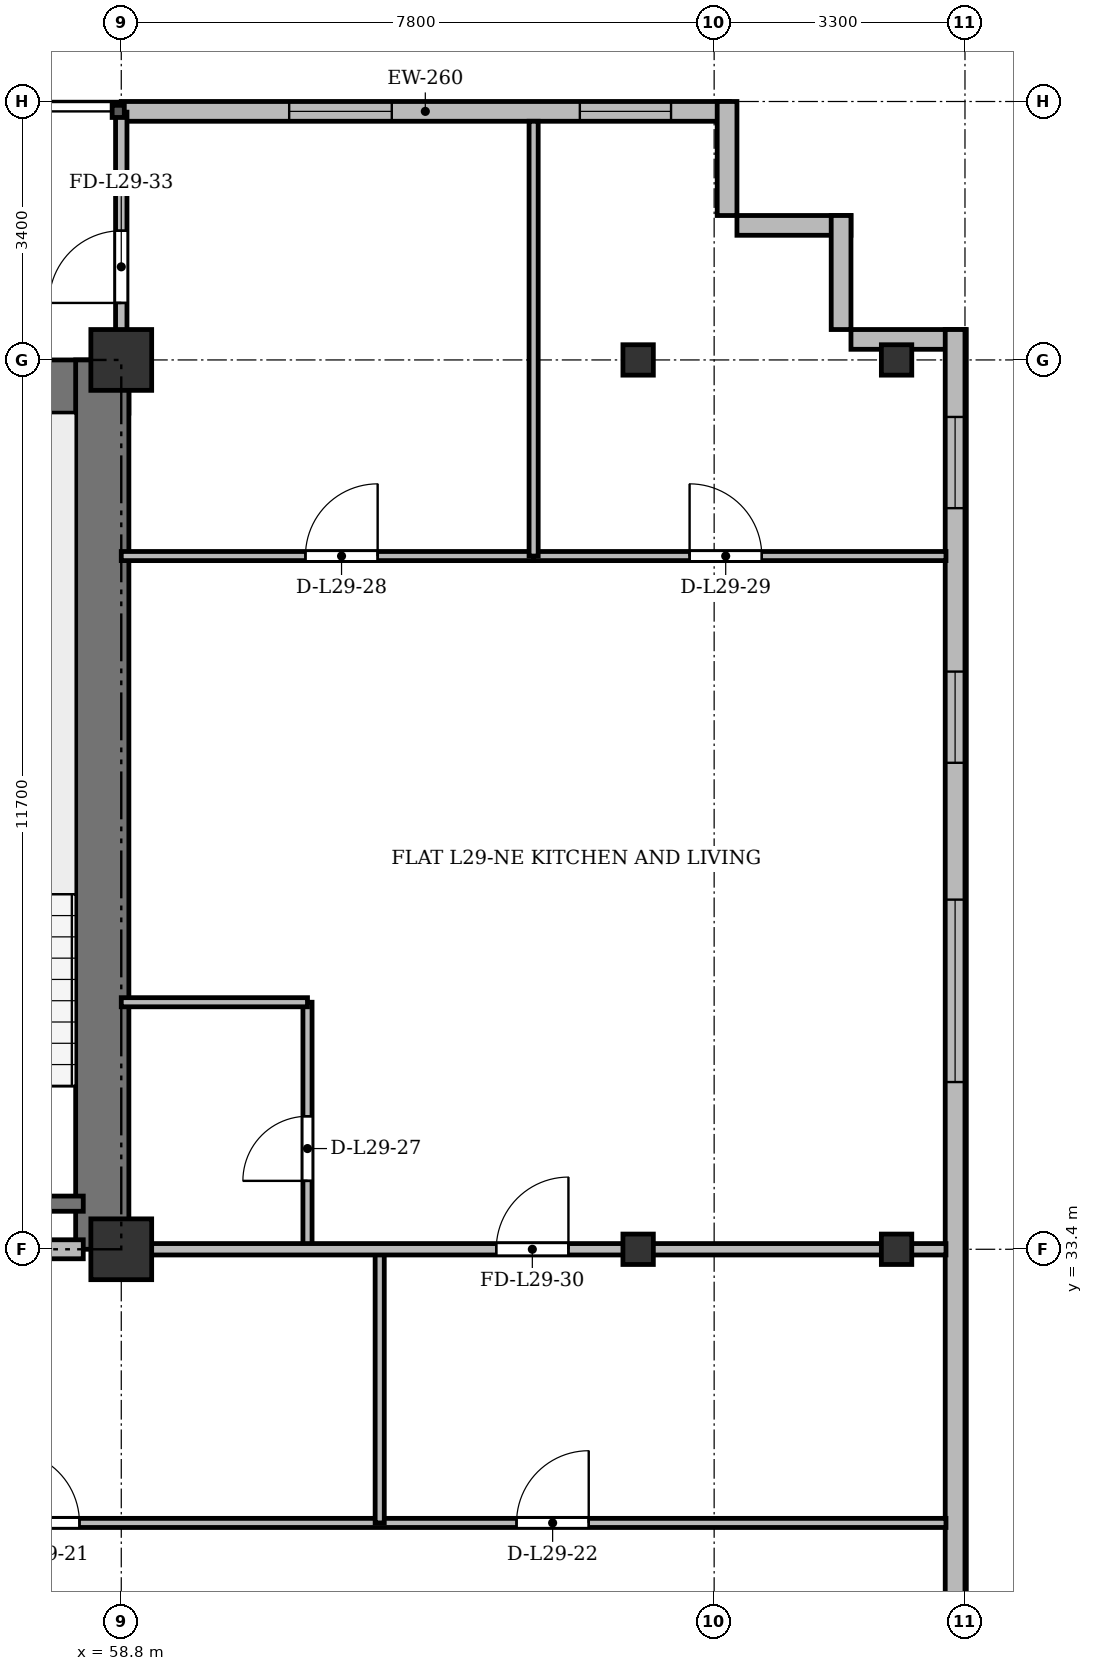
"""IFC4 building model, lengths in metres.
Left out: names, types, materials, properties, quantities, classifications, styles, units other than length and angle.
Written with IfcOpenShell. Run it as: python <this file> out.ifc"""

import sys

from ifc_helpers import new_model, si_unit, direction, frame, frame_2d, origin, origin_2d, place, context, subcontext, project, spatial, rectangle, i_section, extrude, source, transform, mapped, element, fill, save


model = new_model("IFC4")
c1 = context("Model", 3, precision=1e-05, world=origin(), true_north=direction((0.0, 1.0)))
c2 = subcontext(c1, "Body", "Model", "MODEL_VIEW")
j1 = project(units=[si_unit("LENGTHUNIT", "METRE"), si_unit("PLANEANGLEUNIT", "RADIAN")], contexts=[c1])
p1 = place(None, origin())
s1 = spatial("IfcSite", under=j1, at=p1, CompositionType="ELEMENT")
p2 = place(p1, origin())
s2 = spatial("IfcBuilding", under=s1, at=p2, CompositionType="ELEMENT")
p3 = place(p2, frame((0.0, 0.0, 114.1)))
s3 = spatial("IfcBuildingStorey", under=s2, at=p3, CompositionType="ELEMENT", Elevation=114.1)
m1 = source(origin(), c2, "Body", "SweptSolid", [
    extrude(rectangle(XDim=0.8, YDim=0.8, at=origin_2d()), origin(), (0.0, 0.0, 1.0), 3.6),
])
for number, where, z_axis, x_axis in (
    (1, (58.8, 33.4, 0.0), (0.0, 0.0, 1.0), (1.0, 0.0, 0.0)),
    (2, (58.8, 45.1, 0.0), (0.0, 0.0, 1.0), (1.0, 0.0, 0.0)),
):
    element("IfcColumn", number, at=place(p3, frame(where, z_axis=z_axis, x_axis=x_axis)), inside=s3, PredefinedType="COLUMN", context=c2, shape_type="MappedRepresentation", body=[
        mapped(m1, transform((0.0, 0.0, 0.0), x_axis=(1.0, 0.0, 0.0), y_axis=(0.0, 1.0, 0.0), z_axis=(0.0, 0.0, 1.0), scale=1.0)),
    ])
m2 = source(origin(), c2, "Body", "SweptSolid", [
    extrude(i_section(OverallWidth=0.4, OverallDepth=0.4, WebThickness=0.022, FlangeThickness=0.035, at=origin_2d()), origin(), (0.0, 0.0, 1.0), 3.6),
])
for number, where, z_axis, x_axis in (
    (3, (65.6, 33.4, 0.0), (0.0, 0.0, 1.0), (1.0, 0.0, 0.0)),
    (4, (65.6, 45.1, 0.0), (0.0, 0.0, 1.0), (1.0, 0.0, 0.0)),
    (5, (69.0, 33.4, 0.0), (0.0, 0.0, 1.0), (1.0, 0.0, 0.0)),
    (6, (69.0, 45.1, 0.0), (0.0, 0.0, 1.0), (1.0, 0.0, 0.0)),
):
    element("IfcColumn", number, at=place(p3, frame(where, z_axis=z_axis, x_axis=x_axis)), inside=s3, PredefinedType="COLUMN", context=c2, shape_type="MappedRepresentation", body=[
        mapped(m2, transform((0.0, 0.0, 0.0), x_axis=(1.0, 0.0, 0.0), y_axis=(0.0, 1.0, 0.0), z_axis=(0.0, 0.0, 1.0), scale=1.0)),
    ])
p4 = place(p3, frame((58.8, 48.37, 0.0), z_axis=(0.0, 0.0, 1.0), x_axis=(1.0, 0.0, 0.0)))
e7 = element("IfcWall", 7, at=p4, inside=s3, PredefinedType="SOLIDWALL", context=c2, shape_type="SweptSolid", body=[
    extrude(rectangle(XDim=8.0, YDim=0.26, at=frame_2d((4.0, 0.0))), origin(), (0.0, 0.0, 1.0), 3.34),
])
p5 = place(p4, frame((2.209, 0.0, 0.9)))
e8 = element("IfcOpeningElement", 8, at=p5, cuts=e7, PredefinedType="OPENING", context=c2, shape_type="SweptSolid", body=[
    extrude(rectangle(XDim=1.35, YDim=1.5, at=frame_2d((0.675, 0.75))), frame((0.0, 0.14, 0.0), z_axis=(0.0, -1.0, 0.0), x_axis=(1.0, 0.0, 0.0)), (0.0, 0.0, 1.0), 0.28),
])
p6 = place(p4, frame((6.033, 0.0, 0.9)))
e9 = element("IfcOpeningElement", 9, at=p6, cuts=e7, PredefinedType="OPENING", context=c2, shape_type="SweptSolid", body=[
    extrude(rectangle(XDim=1.2, YDim=1.65, at=frame_2d((0.6, 0.825))), frame((0.0, 0.14, 0.0), z_axis=(0.0, -1.0, 0.0), x_axis=(1.0, 0.0, 0.0)), (0.0, 0.0, 1.0), 0.28),
])
for number, where, z_axis, x_axis in (
    (10, (66.77, 48.5, 0.0), (0.0, 0.0, 1.0), (0.0, -1.0, 0.0)),
    (11, (66.9, 46.87, 0.0), (0.0, 0.0, 1.0), (1.0, 0.0, 0.0)),
    (12, (68.27, 47.0, 0.0), (0.0, 0.0, 1.0), (0.0, -1.0, 0.0)),
):
    element("IfcWall", number, at=place(p3, frame(where, z_axis=z_axis, x_axis=x_axis)), inside=s3, PredefinedType="SOLIDWALL", context=c2, shape_type="SweptSolid", body=[
        extrude(rectangle(XDim=1.5, YDim=0.26, at=frame_2d((0.75, 0.0))), origin(), (0.0, 0.0, 1.0), 3.34),
    ])
p7 = place(p3, frame((68.4, 45.37, 0.0), z_axis=(0.0, 0.0, 1.0), x_axis=(1.0, 0.0, 0.0)))
e13 = element("IfcWall", 13, at=p7, inside=s3, PredefinedType="SOLIDWALL", context=c2, shape_type="SweptSolid", body=[
    extrude(rectangle(XDim=1.5, YDim=0.26, at=frame_2d((0.75, 0.0))), origin(), (0.0, 0.0, 1.0), 2.752),
])
p8 = place(p3, frame((69.77, 45.5, 0.0), z_axis=(0.0, 0.0, 1.0), x_axis=(0.0, -1.0, 0.0)))
e14 = element("IfcWall", 14, at=p8, inside=s3, PredefinedType="SOLIDWALL", context=c2, shape_type="SweptSolid", body=[
    extrude(rectangle(XDim=39.6, YDim=0.26, at=frame_2d((19.8, 0.0))), origin(), (0.0, 0.0, 1.0), 3.34),
])
p9 = place(p8, frame((36.95, 0.0, 0.92)))
e15 = element("IfcOpeningElement", 15, at=p9, cuts=e14, PredefinedType="OPENING", context=c2, shape_type="SweptSolid", body=[
    extrude(rectangle(XDim=1.2, YDim=1.65, at=frame_2d((0.6, 0.825))), frame((0.0, 0.14, 0.0), z_axis=(0.0, -1.0, 0.0), x_axis=(1.0, 0.0, 0.0)), (0.0, 0.0, 1.0), 0.28),
])
p10 = place(p8, frame((32.9, 0.0, 0.92)))
e16 = element("IfcOpeningElement", 16, at=p10, cuts=e14, PredefinedType="OPENING", context=c2, shape_type="SweptSolid", body=[
    extrude(rectangle(XDim=2.4, YDim=2.1, at=frame_2d((1.2, 1.05))), frame((0.0, 0.14, 0.0), z_axis=(0.0, -1.0, 0.0), x_axis=(1.0, 0.0, 0.0)), (0.0, 0.0, 1.0), 0.28),
])
p11 = place(p8, frame((28.7, 0.0, 0.92)))
e17 = element("IfcOpeningElement", 17, at=p11, cuts=e14, PredefinedType="OPENING", context=c2, shape_type="SweptSolid", body=[
    extrude(rectangle(XDim=2.4, YDim=2.1, at=frame_2d((1.2, 1.05))), frame((0.0, 0.14, 0.0), z_axis=(0.0, -1.0, 0.0), x_axis=(1.0, 0.0, 0.0)), (0.0, 0.0, 1.0), 0.28),
])
p12 = place(p8, frame((21.5, 0.0, 0.92)))
e18 = element("IfcOpeningElement", 18, at=p12, cuts=e14, PredefinedType="OPENING", context=c2, shape_type="SweptSolid", body=[
    extrude(rectangle(XDim=2.4, YDim=2.1, at=frame_2d((1.2, 1.05))), frame((0.0, 0.14, 0.0), z_axis=(0.0, -1.0, 0.0), x_axis=(1.0, 0.0, 0.0)), (0.0, 0.0, 1.0), 0.28),
])
p13 = place(p8, frame((7.5, 0.0, 0.92)))
e19 = element("IfcOpeningElement", 19, at=p13, cuts=e14, PredefinedType="OPENING", context=c2, shape_type="SweptSolid", body=[
    extrude(rectangle(XDim=2.4, YDim=2.1, at=frame_2d((1.2, 1.05))), frame((0.0, 0.14, 0.0), z_axis=(0.0, -1.0, 0.0), x_axis=(1.0, 0.0, 0.0)), (0.0, 0.0, 1.0), 0.28),
])
p14 = place(p8, frame((4.5, 0.0, 0.92)))
e20 = element("IfcOpeningElement", 20, at=p14, cuts=e14, PredefinedType="OPENING", context=c2, shape_type="SweptSolid", body=[
    extrude(rectangle(XDim=1.2, YDim=1.65, at=frame_2d((0.6, 0.825))), frame((0.0, 0.14, 0.0), z_axis=(0.0, -1.0, 0.0), x_axis=(1.0, 0.0, 0.0)), (0.0, 0.0, 1.0), 0.28),
])
p15 = place(p8, frame((1.15, 0.0, 0.92)))
e21 = element("IfcOpeningElement", 21, at=p15, cuts=e14, PredefinedType="OPENING", context=c2, shape_type="SweptSolid", body=[
    extrude(rectangle(XDim=1.2, YDim=1.65, at=frame_2d((0.6, 0.825))), frame((0.0, 0.14, 0.0), z_axis=(0.0, -1.0, 0.0), x_axis=(1.0, 0.0, 0.0)), (0.0, 0.0, 1.0), 0.28),
])
p16 = place(p3, frame((15.5, 44.75, 0.0), z_axis=(0.0, 0.0, 1.0), x_axis=(1.0, 0.0, 0.0)))
e22 = element("IfcWall", 22, at=p16, inside=s3, PredefinedType="SHEAR", context=c2, shape_type="SweptSolid", body=[
    extrude(rectangle(XDim=43.4, YDim=0.7, at=frame_2d((21.7, 0.0))), origin(), (0.0, 0.0, 1.0), 3.34),
])
p17 = place(p3, frame((58.55, 33.4, 0.0), z_axis=(0.0, 0.0, 1.0), x_axis=(0.0, 1.0, 0.0)))
e23 = element("IfcWall", 23, at=p17, inside=s3, PredefinedType="SHEAR", context=c2, shape_type="SweptSolid", body=[
    extrude(rectangle(XDim=11.7, YDim=0.7, at=frame_2d((5.85, 0.0))), origin(), (0.0, 0.0, 1.0), 3.34),
])
p18 = place(p3, frame((54.9, 34.0, 0.0), z_axis=(0.0, 0.0, 1.0), x_axis=(1.0, 0.0, 0.0)))
e24 = element("IfcWall", 24, at=p18, inside=s3, PredefinedType="SHEAR", context=c2, shape_type="SweptSolid", body=[
    extrude(rectangle(XDim=3.4, YDim=0.2, at=frame_2d((1.7, 0.0))), origin(), (0.0, 0.0, 1.0), 3.34),
])
p19 = place(p3, frame((47.15, 33.4, 0.0), z_axis=(0.0, 0.0, 1.0), x_axis=(1.0, 0.0, 0.0)))
e25 = element("IfcWall", 25, at=p19, inside=s3, PredefinedType="PARTITIONING", context=c2, shape_type="SweptSolid", body=[
    extrude(rectangle(XDim=11.15, YDim=0.25, at=frame_2d((5.575, 0.0))), origin(), (0.0, 0.0, 1.0), 2.752),
])
p20 = place(p19, frame((0.7, 0.0, 0.0)))
e26 = element("IfcOpeningElement", 26, at=p20, cuts=e25, PredefinedType="OPENING", context=c2, shape_type="SweptSolid", body=[
    extrude(rectangle(XDim=0.95, YDim=2.15, at=frame_2d((0.475, 1.075))), frame((0.0, 0.135, 0.0), z_axis=(0.0, -1.0, 0.0), x_axis=(1.0, 0.0, 0.0)), (0.0, 0.0, 1.0), 0.27),
])
p21 = place(p19, frame((6.0, 0.0, 0.0)))
e27 = element("IfcOpeningElement", 27, at=p21, cuts=e25, PredefinedType="OPENING", context=c2, shape_type="SweptSolid", body=[
    extrude(rectangle(XDim=1.2, YDim=2.15, at=frame_2d((0.6, 1.075))), frame((0.0, 0.135, 0.0), z_axis=(0.0, -1.0, 0.0), x_axis=(1.0, 0.0, 0.0)), (0.0, 0.0, 1.0), 0.27),
])
p22 = place(p3, frame((54.8, 29.8, 0.0), z_axis=(0.0, 0.0, 1.0), x_axis=(1.0, 0.0, 0.0)))
e28 = element("IfcWall", 28, at=p22, inside=s3, PredefinedType="PARTITIONING", context=c2, shape_type="SweptSolid", body=[
    extrude(rectangle(XDim=14.85, YDim=0.12, at=frame_2d((7.425, 0.0))), origin(), (0.0, 0.0, 1.0), 2.84),
])
p23 = place(p22, frame((2.5, 0.0, 0.0)))
e29 = element("IfcOpeningElement", 29, at=p23, cuts=e28, PredefinedType="OPENING", context=c2, shape_type="SweptSolid", body=[
    extrude(rectangle(XDim=0.95, YDim=2.15, at=frame_2d((0.475, 1.075))), frame((0.0, 0.07, 0.0), z_axis=(0.0, -1.0, 0.0), x_axis=(1.0, 0.0, 0.0)), (0.0, 0.0, 1.0), 0.14),
])
p24 = place(p22, frame((9.2, 0.0, 0.0)))
e30 = element("IfcOpeningElement", 30, at=p24, cuts=e28, PredefinedType="OPENING", context=c2, shape_type="SweptSolid", body=[
    extrude(rectangle(XDim=0.95, YDim=2.15, at=frame_2d((0.475, 1.075))), frame((0.0, 0.07, 0.0), z_axis=(0.0, -1.0, 0.0), x_axis=(1.0, 0.0, 0.0)), (0.0, 0.0, 1.0), 0.14),
])
p25 = place(p3, frame((62.2, 29.8, 0.0), z_axis=(0.0, 0.0, 1.0), x_axis=(0.0, 1.0, 0.0)))
e31 = element("IfcWall", 31, at=p25, inside=s3, PredefinedType="PARTITIONING", context=c2, shape_type="SweptSolid", body=[
    extrude(rectangle(XDim=3.6, YDim=0.12, at=frame_2d((1.8, 0.0))), origin(), (0.0, 0.0, 1.0), 2.752),
])
p26 = place(p3, frame((61.25, 33.4, 0.0), z_axis=(0.0, 0.0, 1.0), x_axis=(0.0, 1.0, 0.0)))
e32 = element("IfcWall", 32, at=p26, inside=s3, PredefinedType="PARTITIONING", context=c2, shape_type="SweptSolid", body=[
    extrude(rectangle(XDim=3.25, YDim=0.12, at=frame_2d((1.625, 0.0))), origin(), (0.0, 0.0, 1.0), 2.752),
])
p27 = place(p26, frame((0.9, 0.0, 0.0)))
e33 = element("IfcOpeningElement", 33, at=p27, cuts=e32, PredefinedType="OPENING", context=c2, shape_type="SweptSolid", body=[
    extrude(rectangle(XDim=0.85, YDim=2.1, at=frame_2d((0.425, 1.05))), frame((0.0, 0.07, 0.0), z_axis=(0.0, -1.0, 0.0), x_axis=(1.0, 0.0, 0.0)), (0.0, 0.0, 1.0), 0.14),
])
p28 = place(p3, frame((58.8, 36.65, 0.0), z_axis=(0.0, 0.0, 1.0), x_axis=(1.0, 0.0, 0.0)))
e34 = element("IfcWall", 34, at=p28, inside=s3, PredefinedType="PARTITIONING", context=c2, shape_type="SweptSolid", body=[
    extrude(rectangle(XDim=2.45, YDim=0.12, at=frame_2d((1.225, 0.0))), origin(), (0.0, 0.0, 1.0), 2.84),
])
p29 = place(p3, frame((58.8, 42.52, 0.0), z_axis=(0.0, 0.0, 1.0), x_axis=(1.0, 0.0, 0.0)))
e35 = element("IfcWall", 35, at=p29, inside=s3, PredefinedType="PARTITIONING", context=c2, shape_type="SweptSolid", body=[
    extrude(rectangle(XDim=5.425, YDim=0.12, at=frame_2d((2.712, 0.0))), origin(), (0.0, 0.0, 1.0), 2.84),
])
p30 = place(p29, frame((2.423, 0.0, 0.0)))
e36 = element("IfcOpeningElement", 36, at=p30, cuts=e35, PredefinedType="OPENING", context=c2, shape_type="SweptSolid", body=[
    extrude(rectangle(XDim=0.95, YDim=2.15, at=frame_2d((0.475, 1.075))), frame((0.0, 0.07, 0.0), z_axis=(0.0, -1.0, 0.0), x_axis=(1.0, 0.0, 0.0)), (0.0, 0.0, 1.0), 0.14),
])
p31 = place(p3, frame((64.225, 42.52, 0.0), z_axis=(0.0, 0.0, 1.0), x_axis=(1.0, 0.0, 0.0)))
e37 = element("IfcWall", 37, at=p31, inside=s3, PredefinedType="PARTITIONING", context=c2, shape_type="SweptSolid", body=[
    extrude(rectangle(XDim=5.425, YDim=0.12, at=frame_2d((2.712, 0.0))), origin(), (0.0, 0.0, 1.0), 2.84),
])
p32 = place(p31, frame((2.052, 0.0, 0.0)))
e38 = element("IfcOpeningElement", 38, at=p32, cuts=e37, PredefinedType="OPENING", context=c2, shape_type="SweptSolid", body=[
    extrude(rectangle(XDim=0.95, YDim=2.15, at=frame_2d((0.475, 1.075))), frame((0.0, 0.07, 0.0), z_axis=(0.0, -1.0, 0.0), x_axis=(1.0, 0.0, 0.0)), (0.0, 0.0, 1.0), 0.14),
])
p33 = place(p3, frame((64.225, 42.52, 0.0), z_axis=(0.0, 0.0, 1.0), x_axis=(0.0, 1.0, 0.0)))
e39 = element("IfcWall", 39, at=p33, inside=s3, PredefinedType="PARTITIONING", context=c2, shape_type="SweptSolid", body=[
    extrude(rectangle(XDim=5.72, YDim=0.12, at=frame_2d((2.86, 0.0))), origin(), (0.0, 0.0, 1.0), 2.752),
])
p34 = place(p3, frame((58.8, 33.4, 0.0), z_axis=(0.0, 0.0, 1.0), x_axis=(1.0, 0.0, 0.0)))
e40 = element("IfcWall", 40, at=p34, inside=s3, PredefinedType="PARTITIONING", context=c2, shape_type="SweptSolid", body=[
    extrude(rectangle(XDim=10.85, YDim=0.15, at=frame_2d((5.425, 0.0))), origin(), (0.0, 0.0, 1.0), 2.752),
])
p35 = place(p34, frame((4.933, 0.0, 0.0)))
e41 = element("IfcOpeningElement", 41, at=p35, cuts=e40, PredefinedType="OPENING", context=c2, shape_type="SweptSolid", body=[
    extrude(rectangle(XDim=0.95, YDim=2.15, at=frame_2d((0.475, 1.075))), frame((0.0, 0.085, 0.0), z_axis=(0.0, -1.0, 0.0), x_axis=(1.0, 0.0, 0.0)), (0.0, 0.0, 1.0), 0.17),
])
p36 = place(p3, frame((58.8, 44.75, 0.0), z_axis=(0.0, 0.0, 1.0), x_axis=(0.0, 1.0, 0.0)))
e42 = element("IfcWall", 42, at=p36, inside=s3, PredefinedType="PARTITIONING", context=c2, shape_type="SweptSolid", body=[
    extrude(rectangle(XDim=3.61, YDim=0.15, at=frame_2d((1.805, 0.0))), origin(), (0.0, 0.0, 1.0), 2.84),
])
p37 = place(p36, frame((1.1, 0.0, 0.0)))
e43 = element("IfcOpeningElement", 43, at=p37, cuts=e42, PredefinedType="OPENING", context=c2, shape_type="SweptSolid", body=[
    extrude(rectangle(XDim=0.95, YDim=2.15, at=frame_2d((0.475, 1.075))), frame((0.0, 0.085, 0.0), z_axis=(0.0, -1.0, 0.0), x_axis=(1.0, 0.0, 0.0)), (0.0, 0.0, 1.0), 0.17),
])
m3 = source(origin(), c2, "Body", "SweptSolid", [
    extrude(rectangle(XDim=1.35, YDim=1.5, at=frame_2d((0.675, 0.75))), frame((0.0, 0.03, 0.0), z_axis=(0.0, -1.0, 0.0), x_axis=(1.0, 0.0, 0.0)), (0.0, 0.0, 1.0), 0.06),
])
p38 = place(p5, origin())
e44 = element("IfcWindow", 44, at=p38, inside=s3, PartitioningType="SINGLE_PANEL", PredefinedType="WINDOW", context=c2, shape_type="MappedRepresentation", body=[
    mapped(m3, transform((0.0, 0.0, 0.0), x_axis=(1.0, 0.0, 0.0), y_axis=(0.0, 1.0, 0.0), z_axis=(0.0, 0.0, 1.0), scale=1.0)),
])
fill(e8, e44)
m4 = source(origin(), c2, "Body", "SweptSolid", [
    extrude(rectangle(XDim=1.2, YDim=1.65, at=frame_2d((0.6, 0.825))), frame((0.0, 0.03, 0.0), z_axis=(0.0, -1.0, 0.0), x_axis=(1.0, 0.0, 0.0)), (0.0, 0.0, 1.0), 0.06),
])
p39 = place(p6, origin())
e45 = element("IfcWindow", 45, at=p39, inside=s3, PartitioningType="SINGLE_PANEL", PredefinedType="WINDOW", context=c2, shape_type="MappedRepresentation", body=[
    mapped(m4, transform((0.0, 0.0, 0.0), x_axis=(1.0, 0.0, 0.0), y_axis=(0.0, 1.0, 0.0), z_axis=(0.0, 0.0, 1.0), scale=1.0)),
])
fill(e9, e45)
m5 = source(origin(), c2, "Body", "SweptSolid", [
    extrude(rectangle(XDim=2.4, YDim=2.1, at=frame_2d((1.2, 1.05))), frame((0.0, 0.03, 0.0), z_axis=(0.0, -1.0, 0.0), x_axis=(1.0, 0.0, 0.0)), (0.0, 0.0, 1.0), 0.06),
])
p40 = place(p13, origin())
e46 = element("IfcWindow", 46, at=p40, inside=s3, PartitioningType="SINGLE_PANEL", PredefinedType="WINDOW", context=c2, shape_type="MappedRepresentation", body=[
    mapped(m5, transform((0.0, 0.0, 0.0), x_axis=(1.0, 0.0, 0.0), y_axis=(0.0, 1.0, 0.0), z_axis=(0.0, 0.0, 1.0), scale=1.0)),
])
fill(e19, e46)
p41 = place(p14, origin())
e47 = element("IfcWindow", 47, at=p41, inside=s3, PartitioningType="SINGLE_PANEL", PredefinedType="WINDOW", context=c2, shape_type="MappedRepresentation", body=[
    mapped(m4, transform((0.0, 0.0, 0.0), x_axis=(1.0, 0.0, 0.0), y_axis=(0.0, 1.0, 0.0), z_axis=(0.0, 0.0, 1.0), scale=1.0)),
])
fill(e20, e47)
p42 = place(p15, origin())
e48 = element("IfcWindow", 48, at=p42, inside=s3, PartitioningType="SINGLE_PANEL", PredefinedType="WINDOW", context=c2, shape_type="MappedRepresentation", body=[
    mapped(m4, transform((0.0, 0.0, 0.0), x_axis=(1.0, 0.0, 0.0), y_axis=(0.0, 1.0, 0.0), z_axis=(0.0, 0.0, 1.0), scale=1.0)),
])
fill(e21, e48)
m6 = source(origin(), c2, "Body", "SweptSolid", [
    extrude(rectangle(XDim=0.95, YDim=2.15, at=frame_2d((0.475, 1.075))), frame((0.0, 0.025, 0.0), z_axis=(0.0, -1.0, 0.0), x_axis=(1.0, 0.0, 0.0)), (0.0, 0.0, 1.0), 0.05),
])
p43 = place(p23, origin())
e49 = element("IfcDoor", 49, at=p43, inside=s3, OperationType="SINGLE_SWING_LEFT", PredefinedType="DOOR", context=c2, shape_type="MappedRepresentation", body=[
    mapped(m6, transform((0.0, 0.0, 0.0), x_axis=(1.0, 0.0, 0.0), y_axis=(0.0, 1.0, 0.0), z_axis=(0.0, 0.0, 1.0), scale=1.0)),
])
fill(e29, e49)
p44 = place(p24, origin())
e50 = element("IfcDoor", 50, at=p44, inside=s3, OperationType="SINGLE_SWING_RIGHT", PredefinedType="DOOR", context=c2, shape_type="MappedRepresentation", body=[
    mapped(m6, transform((0.0, 0.0, 0.0), x_axis=(1.0, 0.0, 0.0), y_axis=(0.0, 1.0, 0.0), z_axis=(0.0, 0.0, 1.0), scale=1.0)),
])
fill(e30, e50)
m7 = source(origin(), c2, "Body", "SweptSolid", [
    extrude(rectangle(XDim=0.85, YDim=2.1, at=frame_2d((0.425, 1.05))), frame((0.0, 0.025, 0.0), z_axis=(0.0, -1.0, 0.0), x_axis=(1.0, 0.0, 0.0)), (0.0, 0.0, 1.0), 0.05),
])
p45 = place(p27, origin())
e51 = element("IfcDoor", 51, at=p45, inside=s3, OperationType="SINGLE_SWING_LEFT", PredefinedType="DOOR", context=c2, shape_type="MappedRepresentation", body=[
    mapped(m7, transform((0.0, 0.0, 0.0), x_axis=(1.0, 0.0, 0.0), y_axis=(0.0, 1.0, 0.0), z_axis=(0.0, 0.0, 1.0), scale=1.0)),
])
fill(e33, e51)
p46 = place(p30, origin())
e52 = element("IfcDoor", 52, at=p46, inside=s3, OperationType="SINGLE_SWING_RIGHT", PredefinedType="DOOR", context=c2, shape_type="MappedRepresentation", body=[
    mapped(m6, transform((0.0, 0.0, 0.0), x_axis=(1.0, 0.0, 0.0), y_axis=(0.0, 1.0, 0.0), z_axis=(0.0, 0.0, 1.0), scale=1.0)),
])
fill(e36, e52)
p47 = place(p32, origin())
e53 = element("IfcDoor", 53, at=p47, inside=s3, OperationType="SINGLE_SWING_LEFT", PredefinedType="DOOR", context=c2, shape_type="MappedRepresentation", body=[
    mapped(m6, transform((0.0, 0.0, 0.0), x_axis=(1.0, 0.0, 0.0), y_axis=(0.0, 1.0, 0.0), z_axis=(0.0, 0.0, 1.0), scale=1.0)),
])
fill(e38, e53)
p48 = place(p35, origin())
e54 = element("IfcDoor", 54, at=p48, inside=s3, OperationType="SINGLE_SWING_RIGHT", PredefinedType="DOOR", context=c2, shape_type="MappedRepresentation", body=[
    mapped(m6, transform((0.0, 0.0, 0.0), x_axis=(1.0, 0.0, 0.0), y_axis=(0.0, 1.0, 0.0), z_axis=(0.0, 0.0, 1.0), scale=1.0)),
])
fill(e41, e54)
p49 = place(p37, origin())
e55 = element("IfcDoor", 55, at=p49, inside=s3, OperationType="SINGLE_SWING_LEFT", PredefinedType="DOOR", context=c2, shape_type="MappedRepresentation", body=[
    mapped(m6, transform((0.0, 0.0, 0.0), x_axis=(1.0, 0.0, 0.0), y_axis=(0.0, 1.0, 0.0), z_axis=(0.0, 0.0, 1.0), scale=1.0)),
])
fill(e43, e55)
save(model, sys.argv[1])
